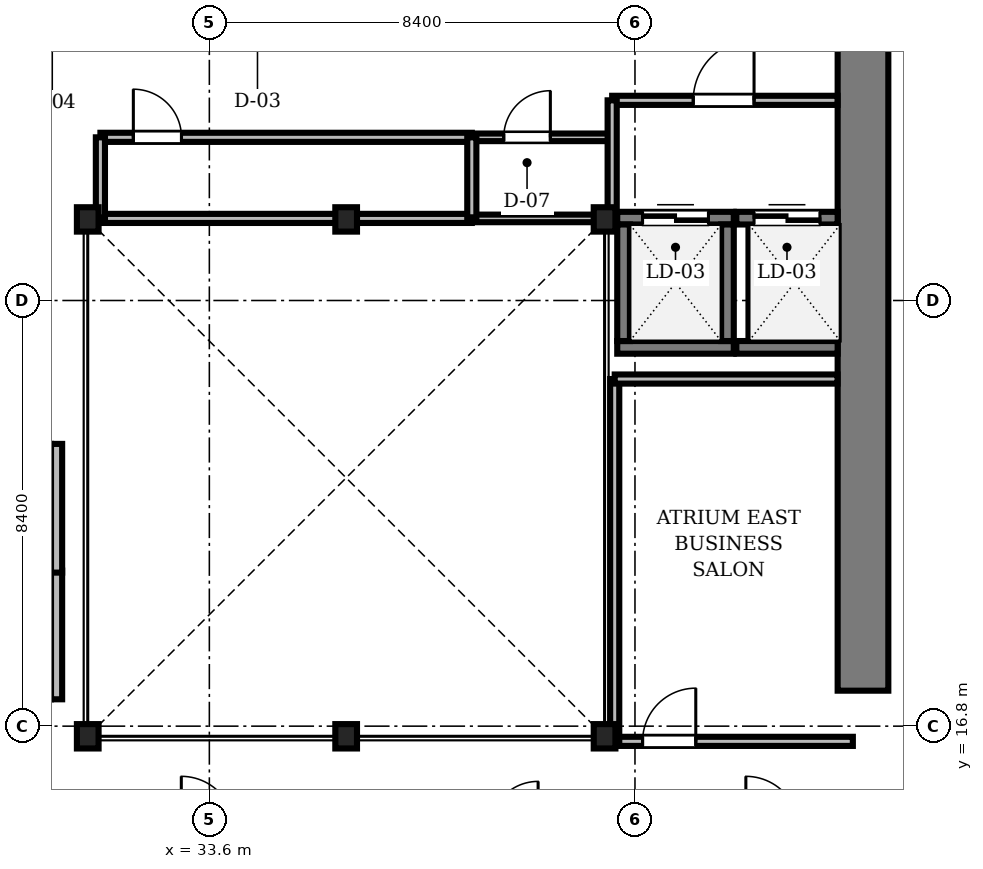
"""IFC4 building model, lengths in metres.
Left out: names, types, materials, properties, quantities, classifications, styles, units other than length and angle.
Written with IfcOpenShell. Run it as: python <this file> out.ifc"""

import sys

from ifc_helpers import new_model, si_unit, direction, frame, frame_2d, origin, origin_2d, place, context, subcontext, project, spatial, rectangle, i_section, extrude, source, transform, mapped, element, fill, save


model = new_model("IFC4")
c1 = context("Model", 3, precision=1e-05, world=origin(), true_north=direction((0.0, 1.0)))
c2 = subcontext(c1, "Body", "Model", "MODEL_VIEW")
j1 = project(units=[si_unit("LENGTHUNIT", "METRE"), si_unit("PLANEANGLEUNIT", "RADIAN")], contexts=[c1])
p1 = place(None, origin())
s1 = spatial("IfcSite", under=j1, at=p1, CompositionType="ELEMENT")
p2 = place(p1, origin())
s2 = spatial("IfcBuilding", under=s1, at=p2, CompositionType="ELEMENT")
p3 = place(p2, frame((0.0, 0.0, 49.5)))
s3 = spatial("IfcBuildingStorey", under=s2, at=p3, CompositionType="ELEMENT", Elevation=49.5)
m1 = source(origin(), c2, "Body", "SweptSolid", [
    extrude(rectangle(XDim=13.15, YDim=1.0, at=frame_2d((6.575, 0.0))), origin(), (0.0, 0.0, 1.0), 3.41),
])
p4 = place(p3, frame((46.5, 17.5, 0.0), z_axis=(0.0, 0.0, 1.0), x_axis=(0.0, 1.0, 0.0)))
e1 = element("IfcWall", 1, at=p4, inside=s3, PredefinedType="SHEAR", context=c2, shape_type="MappedRepresentation", body=[
    mapped(m1, transform((0.0, 0.0, 0.0), scale=1.0)),
])
m2 = source(origin(), c2, "Body", "SweptSolid", [
    extrude(i_section(OverallWidth=0.428, OverallDepth=0.481, WebThickness=0.04, FlangeThickness=0.063, FilletRadius=0.015, at=origin_2d()), origin(), (0.0, 0.0, 1.0), 3.41),
])
for number, where, z_axis, x_axis in (
    (2, (31.2, 16.6, 0.0), (0.0, 0.0, 1.0), (1.0, 0.0, 0.0)),
    (3, (36.3, 16.6, 0.0), (0.0, 0.0, 1.0), (1.0, 0.0, 0.0)),
    (4, (41.4, 16.6, 0.0), (0.0, 0.0, 1.0), (1.0, 0.0, 0.0)),
    (5, (41.4, 26.8, 0.0), (0.0, 0.0, 1.0), (1.0, 0.0, 0.0)),
    (6, (36.3, 26.8, 0.0), (0.0, 0.0, 1.0), (1.0, 0.0, 0.0)),
    (7, (31.2, 26.8, 0.0), (0.0, 0.0, 1.0), (1.0, 0.0, 0.0)),
):
    element("IfcColumn", number, at=place(p3, frame(where, z_axis=z_axis, x_axis=x_axis)), inside=s3, PredefinedType="COLUMN", context=c2, shape_type="MappedRepresentation", body=[
        mapped(m2, transform((0.0, 0.0, 0.0), scale=1.0)),
    ])
m3 = source(origin(), c2, "Body", "SweptSolid", [
    extrude(rectangle(XDim=2.54, YDim=0.22, at=frame_2d((1.27, 0.0))), origin(), (0.0, 0.0, 1.0), 3.41),
])
for number, where, z_axis, x_axis in (
    (8, (30.585, 17.33, 0.0), (0.0, 0.0, 1.0), (0.0, 1.0, 0.0)),
    (9, (30.585, 19.83, 0.0), (0.0, 0.0, 1.0), (0.0, 1.0, 0.0)),
):
    element("IfcWall", number, at=place(p3, frame(where, z_axis=z_axis, x_axis=x_axis)), inside=s3, PredefinedType="SOLIDWALL", context=c2, shape_type="MappedRepresentation", body=[
        mapped(m3, transform((0.0, 0.0, 0.0), scale=1.0)),
    ])
m4 = source(origin(), c2, "Body", "SweptSolid", [
    extrude(rectangle(XDim=2.3, YDim=0.25, at=frame_2d((1.15, 0.0))), origin(), (0.0, 0.0, 1.0), 3.41),
])
p5 = place(p3, frame((41.65, 24.275, 0.0), z_axis=(0.0, 0.0, 1.0), x_axis=(1.0, 0.0, 0.0)))
e10 = element("IfcWall", 10, at=p5, inside=s3, PredefinedType="SOLIDWALL", context=c2, shape_type="MappedRepresentation", body=[
    mapped(m4, transform((0.0, 0.0, 0.0), scale=1.0)),
])
p6 = place(p3, frame((41.65, 26.825, 0.0), z_axis=(0.0, 0.0, 1.0), x_axis=(1.0, 0.0, 0.0)))
e11 = element("IfcWall", 11, at=p6, inside=s3, PredefinedType="SOLIDWALL", context=c2, shape_type="MappedRepresentation", body=[
    mapped(m4, transform((0.0, 0.0, 0.0), scale=1.0)),
])
m5 = source(origin(), c2, "Body", "SweptSolid", [
    extrude(rectangle(XDim=1.3, YDim=2.3, at=frame_2d((0.65, 1.15))), frame((0.0, 0.135, 0.0), z_axis=(0.0, -1.0, 0.0), x_axis=(1.0, 0.0, 0.0)), (0.0, 0.0, 1.0), 0.27),
])
p7 = place(p6, frame((0.5, 0.0, 0.0)))
e12 = element("IfcOpeningElement", 12, at=p7, cuts=e11, PredefinedType="OPENING", context=c2, shape_type="MappedRepresentation", body=[
    mapped(m5, transform((0.0, 0.0, 0.0), scale=1.0)),
])
for number, where, z_axis, x_axis in (
    (13, (41.775, 24.4, 0.0), (0.0, 0.0, 1.0), (0.0, 1.0, 0.0)),
    (14, (43.825, 24.4, 0.0), (0.0, 0.0, 1.0), (0.0, 1.0, 0.0)),
):
    element("IfcWall", number, at=place(p3, frame(where, z_axis=z_axis, x_axis=x_axis)), inside=s3, PredefinedType="SOLIDWALL", context=c2, shape_type="MappedRepresentation", body=[
        mapped(m4, transform((0.0, 0.0, 0.0), scale=1.0)),
    ])
m6 = source(origin(), c2, "Body", "SweptSolid", [
    extrude(rectangle(XDim=2.0, YDim=0.25, at=frame_2d((1.0, 0.0))), origin(), (0.0, 0.0, 1.0), 3.41),
])
p8 = place(p3, frame((44.0, 24.275, 0.0), z_axis=(0.0, 0.0, 1.0), x_axis=(1.0, 0.0, 0.0)))
e15 = element("IfcWall", 15, at=p8, inside=s3, PredefinedType="SOLIDWALL", context=c2, shape_type="MappedRepresentation", body=[
    mapped(m6, transform((0.0, 0.0, 0.0), scale=1.0)),
])
p9 = place(p3, frame((44.0, 26.825, 0.0), z_axis=(0.0, 0.0, 1.0), x_axis=(1.0, 0.0, 0.0)))
e16 = element("IfcWall", 16, at=p9, inside=s3, PredefinedType="SOLIDWALL", context=c2, shape_type="MappedRepresentation", body=[
    mapped(m6, transform((0.0, 0.0, 0.0), scale=1.0)),
])
p10 = place(p9, frame((0.35, 0.0, 0.0)))
e17 = element("IfcOpeningElement", 17, at=p10, cuts=e16, PredefinedType="OPENING", context=c2, shape_type="MappedRepresentation", body=[
    mapped(m5, transform((0.0, 0.0, 0.0), scale=1.0)),
])
m7 = source(origin(), c2, "Body", "SweptSolid", [
    extrude(rectangle(XDim=7.33, YDim=0.18, at=frame_2d((3.665, 0.0))), origin(), (0.0, 0.0, 1.0), 3.042),
])
p11 = place(p3, frame((31.45, 28.42, 0.0), z_axis=(0.0, 0.0, 1.0), x_axis=(1.0, 0.0, 0.0)))
e18 = element("IfcWall", 18, at=p11, inside=s3, PredefinedType="PARTITIONING", context=c2, shape_type="MappedRepresentation", body=[
    mapped(m7, transform((0.0, 0.0, 0.0), scale=1.0)),
])
m8 = source(origin(), c2, "Body", "SweptSolid", [
    extrude(rectangle(XDim=0.95, YDim=2.15, at=frame_2d((0.475, 1.075))), frame((0.0, 0.1, 0.0), z_axis=(0.0, -1.0, 0.0), x_axis=(1.0, 0.0, 0.0)), (0.0, 0.0, 1.0), 0.2),
])
p12 = place(p11, frame((0.65, 0.0, 0.0)))
e19 = element("IfcOpeningElement", 19, at=p12, cuts=e18, PredefinedType="OPENING", context=c2, shape_type="MappedRepresentation", body=[
    mapped(m8, transform((0.0, 0.0, 0.0), scale=1.0)),
])
m9 = source(origin(), c2, "Body", "SweptSolid", [
    extrude(rectangle(XDim=4.448, YDim=0.18, at=frame_2d((2.224, 0.0))), origin(), (0.0, 0.0, 1.0), 3.042),
])
p13 = place(p3, frame((41.55, 29.15, 0.0), z_axis=(0.0, 0.0, 1.0), x_axis=(1.0, 0.0, 0.0)))
e20 = element("IfcWall", 20, at=p13, inside=s3, PredefinedType="PARTITIONING", context=c2, shape_type="MappedRepresentation", body=[
    mapped(m9, transform((0.0, 0.0, 0.0), scale=1.0)),
])
m10 = source(origin(), c2, "Body", "SweptSolid", [
    extrude(rectangle(XDim=1.2, YDim=2.2, at=frame_2d((0.6, 1.1))), frame((0.0, 0.1, 0.0), z_axis=(0.0, -1.0, 0.0), x_axis=(1.0, 0.0, 0.0)), (0.0, 0.0, 1.0), 0.2),
])
p14 = place(p13, frame((1.6, 0.0, 0.0)))
e21 = element("IfcOpeningElement", 21, at=p14, cuts=e20, PredefinedType="OPENING", context=c2, shape_type="MappedRepresentation", body=[
    mapped(m10, transform((0.0, 0.0, 0.0), scale=1.0)),
])
m11 = source(origin(), c2, "Body", "SweptSolid", [
    extrude(rectangle(XDim=4.7, YDim=0.18, at=frame_2d((2.35, 0.0))), origin(), (0.0, 0.0, 1.0), 2.802),
])
p15 = place(p3, frame((41.6, 16.5, 0.0), z_axis=(0.0, 0.0, 1.0), x_axis=(1.0, 0.0, 0.0)))
e22 = element("IfcWall", 22, at=p15, inside=s3, PredefinedType="PARTITIONING", context=c2, shape_type="MappedRepresentation", body=[
    mapped(m11, transform((0.0, 0.0, 0.0), scale=1.0)),
])
m12 = source(origin(), c2, "Body", "SweptSolid", [
    extrude(rectangle(XDim=1.05, YDim=2.2, at=frame_2d((0.525, 1.1))), frame((0.0, 0.1, 0.0), z_axis=(0.0, -1.0, 0.0), x_axis=(1.0, 0.0, 0.0)), (0.0, 0.0, 1.0), 0.2),
])
p16 = place(p15, frame((0.55, 0.0, 0.0)))
e23 = element("IfcOpeningElement", 23, at=p16, cuts=e22, PredefinedType="OPENING", context=c2, shape_type="MappedRepresentation", body=[
    mapped(m12, transform((0.0, 0.0, 0.0), scale=1.0)),
])
m13 = source(origin(), c2, "Body", "SweptSolid", [
    extrude(rectangle(XDim=2.74, YDim=0.15, at=frame_2d((1.37, 0.0))), origin(), (0.0, 0.0, 1.0), 3.41),
])
p17 = place(p3, frame((38.78, 28.42, 0.0), z_axis=(0.0, 0.0, 1.0), x_axis=(1.0, 0.0, 0.0)))
e24 = element("IfcWall", 24, at=p17, inside=s3, PredefinedType="PARTITIONING", context=c2, shape_type="MappedRepresentation", body=[
    mapped(m13, transform((0.0, 0.0, 0.0), scale=1.0)),
])
m14 = source(origin(), c2, "Body", "SweptSolid", [
    extrude(rectangle(XDim=0.92, YDim=2.1, at=frame_2d((0.46, 1.05))), frame((0.0, 0.085, 0.0), z_axis=(0.0, -1.0, 0.0), x_axis=(1.0, 0.0, 0.0)), (0.0, 0.0, 1.0), 0.17),
])
p18 = place(p17, frame((0.63, 0.0, 0.0)))
e25 = element("IfcOpeningElement", 25, at=p18, cuts=e24, PredefinedType="OPENING", context=c2, shape_type="MappedRepresentation", body=[
    mapped(m14, transform((0.0, 0.0, 0.0), scale=1.0)),
])
m15 = source(origin(), c2, "Body", "SweptSolid", [
    extrude(rectangle(XDim=7.33, YDim=0.18, at=frame_2d((3.665, 0.0))), origin(), (0.0, 0.0, 1.0), 2.952),
])
p19 = place(p3, frame((31.45, 26.82, 0.0), z_axis=(0.0, 0.0, 1.0), x_axis=(1.0, 0.0, 0.0)))
e26 = element("IfcWall", 26, at=p19, inside=s3, PredefinedType="PARTITIONING", context=c2, shape_type="MappedRepresentation", body=[
    mapped(m15, transform((0.0, 0.0, 0.0), scale=1.0)),
])
m16 = source(origin(), c2, "Body", "SweptSolid", [
    extrude(rectangle(XDim=7.15, YDim=0.18, at=frame_2d((3.575, 0.0))), origin(), (0.0, 0.0, 1.0), 2.802),
])
p20 = place(p3, frame((41.6, 16.5, 0.0), z_axis=(0.0, 0.0, 1.0), x_axis=(0.0, 1.0, 0.0)))
e27 = element("IfcWall", 27, at=p20, inside=s3, PredefinedType="PARTITIONING", context=c2, shape_type="MappedRepresentation", body=[
    mapped(m16, transform((0.0, 0.0, 0.0), scale=1.0)),
])
m17 = source(origin(), c2, "Body", "SweptSolid", [
    extrude(rectangle(XDim=4.398, YDim=0.18, at=frame_2d((2.199, 0.0))), origin(), (0.0, 0.0, 1.0), 3.41),
])
p21 = place(p3, frame((41.6, 23.65, 0.0), z_axis=(0.0, 0.0, 1.0), x_axis=(1.0, 0.0, 0.0)))
e28 = element("IfcWall", 28, at=p21, inside=s3, PredefinedType="PARTITIONING", context=c2, shape_type="MappedRepresentation", body=[
    mapped(m17, transform((0.0, 0.0, 0.0), scale=1.0)),
])
m18 = source(origin(), c2, "Body", "SweptSolid", [
    extrude(rectangle(XDim=2.74, YDim=0.15, at=frame_2d((1.37, 0.0))), origin(), (0.0, 0.0, 1.0), 2.802),
])
p22 = place(p3, frame((38.78, 26.82, 0.0), z_axis=(0.0, 0.0, 1.0), x_axis=(1.0, 0.0, 0.0)))
e29 = element("IfcWall", 29, at=p22, inside=s3, PredefinedType="PARTITIONING", context=c2, shape_type="MappedRepresentation", body=[
    mapped(m18, transform((0.0, 0.0, 0.0), scale=1.0)),
])
m19 = source(origin(), c2, "Body", "SweptSolid", [
    extrude(rectangle(XDim=2.35, YDim=0.18, at=frame_2d((1.175, 0.0))), origin(), (0.0, 0.0, 1.0), 2.802),
])
p23 = place(p3, frame((41.55, 26.8, 0.0), z_axis=(0.0, 0.0, 1.0), x_axis=(0.0, 1.0, 0.0)))
e30 = element("IfcWall", 30, at=p23, inside=s3, PredefinedType="PARTITIONING", context=c2, shape_type="MappedRepresentation", body=[
    mapped(m19, transform((0.0, 0.0, 0.0), scale=1.0)),
])
m20 = source(origin(), c2, "Body", "SweptSolid", [
    extrude(rectangle(XDim=1.6, YDim=0.18, at=frame_2d((0.8, 0.0))), origin(), (0.0, 0.0, 1.0), 2.952),
])
for number, where, z_axis, x_axis in (
    (31, (31.45, 26.82, 0.0), (0.0, 0.0, 1.0), (0.0, 1.0, 0.0)),
    (32, (38.78, 26.82, 0.0), (0.0, 0.0, 1.0), (0.0, 1.0, 0.0)),
):
    element("IfcWall", number, at=place(p3, frame(where, z_axis=z_axis, x_axis=x_axis)), inside=s3, PredefinedType="PARTITIONING", context=c2, shape_type="MappedRepresentation", body=[
        mapped(m20, transform((0.0, 0.0, 0.0), scale=1.0)),
    ])
m21 = source(origin(), c2, "Body", "SweptSolid", [
    extrude(rectangle(XDim=1.3, YDim=2.3, at=frame_2d((0.65, 1.15))), frame((0.0, 0.025, 0.0), z_axis=(0.0, -1.0, 0.0), x_axis=(1.0, 0.0, 0.0)), (0.0, 0.0, 1.0), 0.05),
])
p24 = place(p7, origin())
e33 = element("IfcDoor", 33, at=p24, inside=s3, OperationType="DOUBLE_DOOR_SLIDING", PredefinedType="DOOR", context=c2, shape_type="MappedRepresentation", body=[
    mapped(m21, transform((0.0, 0.0, 0.0), scale=1.0)),
])
fill(e12, e33)
p25 = place(p10, origin())
e34 = element("IfcDoor", 34, at=p25, inside=s3, OperationType="DOUBLE_DOOR_SLIDING", PredefinedType="DOOR", context=c2, shape_type="MappedRepresentation", body=[
    mapped(m21, transform((0.0, 0.0, 0.0), scale=1.0)),
])
fill(e17, e34)
m22 = source(origin(), c2, "Body", "SweptSolid", [
    extrude(rectangle(XDim=0.95, YDim=2.15, at=frame_2d((0.475, 1.075))), frame((0.0, 0.025, 0.0), z_axis=(0.0, -1.0, 0.0), x_axis=(1.0, 0.0, 0.0)), (0.0, 0.0, 1.0), 0.05),
])
p26 = place(p12, origin())
e35 = element("IfcDoor", 35, at=p26, inside=s3, OperationType="SINGLE_SWING_LEFT", PredefinedType="DOOR", context=c2, shape_type="MappedRepresentation", body=[
    mapped(m22, transform((0.0, 0.0, 0.0), scale=1.0)),
])
fill(e19, e35)
m23 = source(origin(), c2, "Body", "SweptSolid", [
    extrude(rectangle(XDim=1.2, YDim=2.2, at=frame_2d((0.6, 1.1))), frame((0.0, 0.025, 0.0), z_axis=(0.0, -1.0, 0.0), x_axis=(1.0, 0.0, 0.0)), (0.0, 0.0, 1.0), 0.05),
])
p27 = place(p14, origin())
e36 = element("IfcDoor", 36, at=p27, inside=s3, OperationType="SINGLE_SWING_RIGHT", PredefinedType="DOOR", context=c2, shape_type="MappedRepresentation", body=[
    mapped(m23, transform((0.0, 0.0, 0.0), scale=1.0)),
])
fill(e21, e36)
m24 = source(origin(), c2, "Body", "SweptSolid", [
    extrude(rectangle(XDim=1.05, YDim=2.2, at=frame_2d((0.525, 1.1))), frame((0.0, 0.025, 0.0), z_axis=(0.0, -1.0, 0.0), x_axis=(1.0, 0.0, 0.0)), (0.0, 0.0, 1.0), 0.05),
])
p28 = place(p16, origin())
e37 = element("IfcDoor", 37, at=p28, inside=s3, OperationType="SINGLE_SWING_RIGHT", PredefinedType="DOOR", context=c2, shape_type="MappedRepresentation", body=[
    mapped(m24, transform((0.0, 0.0, 0.0), scale=1.0)),
])
fill(e23, e37)
m25 = source(origin(), c2, "Body", "SweptSolid", [
    extrude(rectangle(XDim=0.92, YDim=2.1, at=frame_2d((0.46, 1.05))), frame((0.0, 0.025, 0.0), z_axis=(0.0, -1.0, 0.0), x_axis=(1.0, 0.0, 0.0)), (0.0, 0.0, 1.0), 0.05),
])
p29 = place(p18, origin())
e38 = element("IfcDoor", 38, at=p29, inside=s3, OperationType="SINGLE_SWING_RIGHT", PredefinedType="DOOR", context=c2, shape_type="MappedRepresentation", body=[
    mapped(m25, transform((0.0, 0.0, 0.0), scale=1.0)),
])
fill(e25, e38)
save(model, sys.argv[1])
